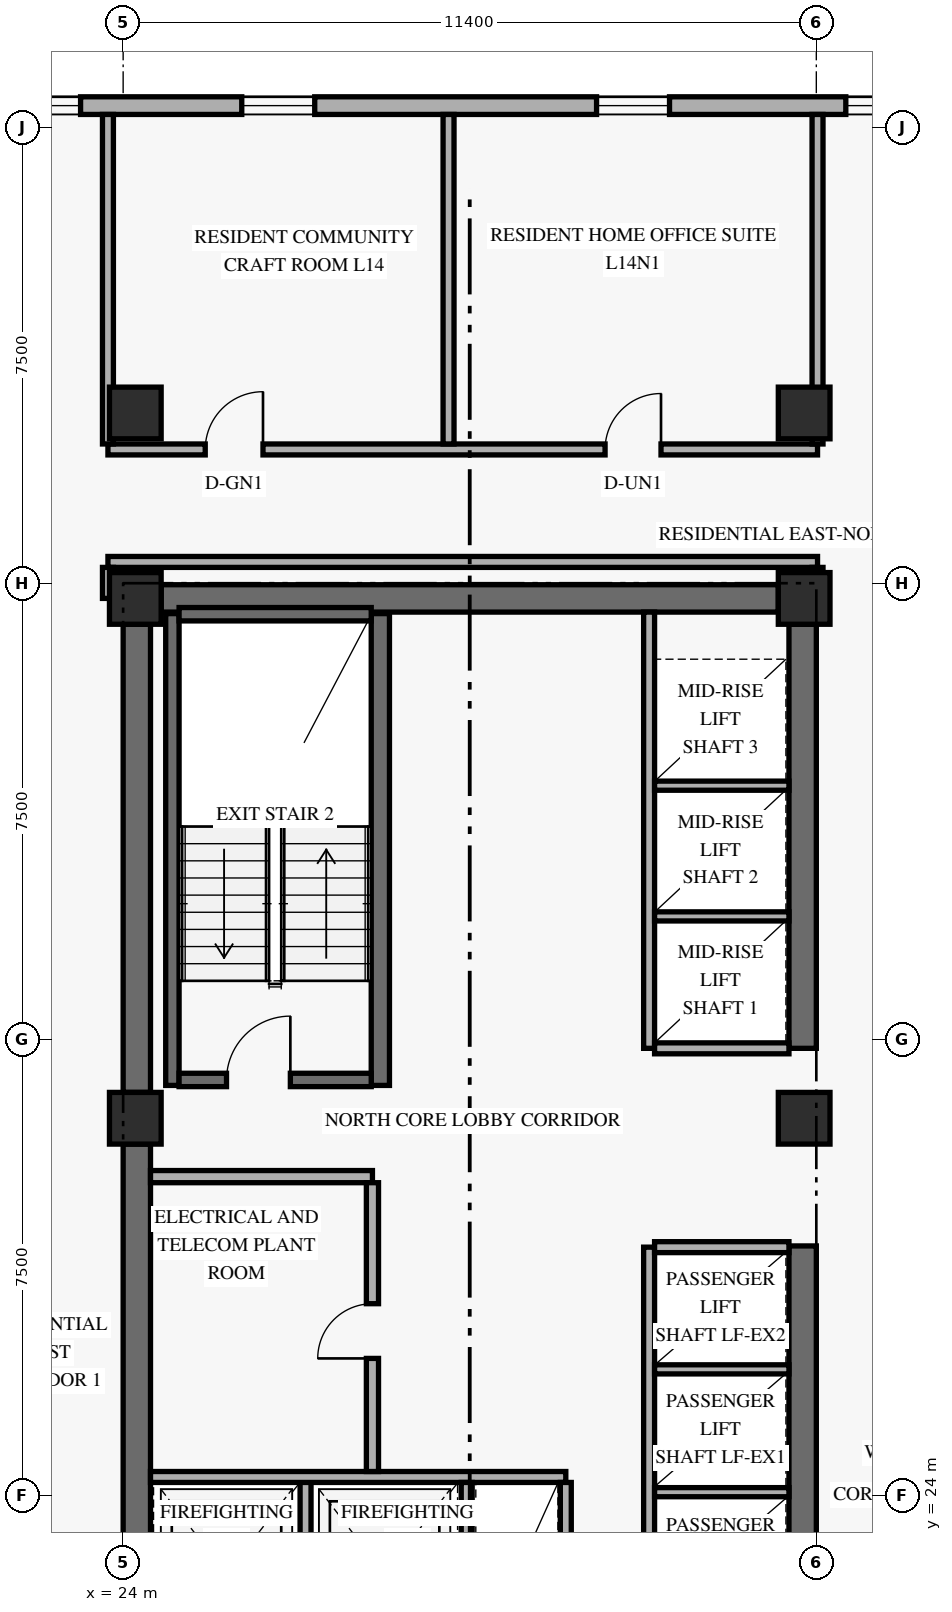
"""IFC4 building model, lengths in metres.
Left out: names, types, materials, properties, quantities, classifications, styles, units other than length and angle.
Written with IfcOpenShell. Run it as: python <this file> out.ifc"""

import sys

from ifc_helpers import new_model, si_unit, direction, frame, frame_2d, origin, origin_2d, place, context, subcontext, project, spatial, rectangle, extrude, element, fill, save


model = new_model("IFC4")
c1 = context("Model", 3, precision=1e-05, world=origin(), true_north=direction((0.0, 1.0)))
c2 = subcontext(c1, "Body", "Model", "MODEL_VIEW")
j1 = project(units=[si_unit("LENGTHUNIT", "METRE"), si_unit("PLANEANGLEUNIT", "RADIAN")], contexts=[c1])
p1 = place(None, origin())
s1 = spatial("IfcSite", under=j1, at=p1, CompositionType="ELEMENT")
p2 = place(p1, origin())
s2 = spatial("IfcBuilding", under=s1, at=p2, CompositionType="ELEMENT")
p3 = place(p2, frame((0.0, 0.0, 56.4)))
s3 = spatial("IfcBuildingStorey", under=s2, at=p3, CompositionType="ELEMENT", Elevation=56.4)
p4 = place(p3, frame((24.225, 17.975, 0.0), z_axis=(0.0, 0.0, 1.0), x_axis=(0.0, 1.0, 0.0)))
e1 = element("IfcWall", 1, at=p4, inside=s3, PredefinedType="SHEAR", context=c2, shape_type="SweptSolid", body=[
    extrude(rectangle(XDim=11.8, YDim=0.45, at=frame_2d((5.9, 0.0))), origin(), (0.0, 0.0, 1.0), 2.657),
])
p5 = place(p3, frame((24.225, 30.625, 0.0), z_axis=(0.0, 0.0, 1.0), x_axis=(0.0, 1.0, 0.0)))
e2 = element("IfcWall", 2, at=p5, inside=s3, PredefinedType="SHEAR", context=c2, shape_type="SweptSolid", body=[
    extrude(rectangle(XDim=7.7, YDim=0.45, at=frame_2d((3.85, 0.0))), origin(), (0.0, 0.0, 1.0), 2.657),
])
p6 = place(p3, frame((35.175, 17.975, 0.0), z_axis=(0.0, 0.0, 1.0), x_axis=(0.0, 1.0, 0.0)))
e3 = element("IfcWall", 3, at=p6, inside=s3, PredefinedType="SHEAR", context=c2, shape_type="SweptSolid", body=[
    extrude(rectangle(XDim=10.125, YDim=0.45, at=frame_2d((5.062, 0.0))), origin(), (0.0, 0.0, 1.0), 2.657),
])
p7 = place(p3, frame((35.175, 31.35, 0.0), z_axis=(0.0, 0.0, 1.0), x_axis=(0.0, 1.0, 0.0)))
e4 = element("IfcWall", 4, at=p7, inside=s3, PredefinedType="SHEAR", context=c2, shape_type="SweptSolid", body=[
    extrude(rectangle(XDim=6.975, YDim=0.45, at=frame_2d((3.487, 0.0))), origin(), (0.0, 0.0, 1.0), 2.657),
])
p8 = place(p3, frame((24.625, 38.75, 0.0), z_axis=(0.0, 0.0, 1.0), x_axis=(1.0, 0.0, 0.0)))
e5 = element("IfcWall", 5, at=p8, inside=s3, PredefinedType="SHEAR", context=c2, shape_type="SweptSolid", body=[
    extrude(rectangle(XDim=10.15, YDim=0.45, at=frame_2d((5.075, 0.0))), origin(), (0.0, 0.0, 1.0), 3.35),
])
p9 = place(p3, frame((24.81, 30.74, 0.0), z_axis=(0.0, 0.0, 1.0), x_axis=(0.0, 1.0, 0.0)))
e6 = element("IfcWall", 6, at=p9, inside=s3, PredefinedType="SHEAR", context=c2, shape_type="SweptSolid", body=[
    extrude(rectangle(XDim=7.76, YDim=0.22, at=frame_2d((3.88, 0.0))), origin(), (0.0, 0.0, 1.0), 3.35),
])
p10 = place(p3, frame((28.23, 30.74, 0.0), z_axis=(0.0, 0.0, 1.0), x_axis=(0.0, 1.0, 0.0)))
e7 = element("IfcWall", 7, at=p10, inside=s3, PredefinedType="SHEAR", context=c2, shape_type="SweptSolid", body=[
    extrude(rectangle(XDim=7.76, YDim=0.3, at=frame_2d((3.88, 0.0))), origin(), (0.0, 0.0, 1.0), 3.35),
])
p11 = place(p3, frame((24.92, 30.83, 0.0), z_axis=(0.0, 0.0, 1.0), x_axis=(1.0, 0.0, 0.0)))
e8 = element("IfcWall", 8, at=p11, inside=s3, PredefinedType="SHEAR", context=c2, shape_type="SweptSolid", body=[
    extrude(rectangle(XDim=3.16, YDim=0.22, at=frame_2d((1.58, 0.0))), origin(), (0.0, 0.0, 1.0), 3.35),
])
p12 = place(p11, frame((0.78, 0.0, 0.0)))
e9 = element("IfcOpeningElement", 9, at=p12, cuts=e8, PredefinedType="OPENING", context=c2, shape_type="SweptSolid", body=[
    extrude(rectangle(XDim=1.05, YDim=2.15, at=frame_2d((0.525, 1.075))), frame((0.0, 0.12, 0.0), z_axis=(0.0, -1.0, 0.0), x_axis=(1.0, 0.0, 0.0)), (0.0, 0.0, 1.0), 0.24),
])
p13 = place(p3, frame((24.92, 38.49, 0.0), z_axis=(0.0, 0.0, 1.0), x_axis=(1.0, 0.0, 0.0)))
e10 = element("IfcWall", 10, at=p13, inside=s3, PredefinedType="SHEAR", context=c2, shape_type="SweptSolid", body=[
    extrude(rectangle(XDim=3.16, YDim=0.22, at=frame_2d((1.58, 0.0))), origin(), (0.0, 0.0, 1.0), 3.35),
])
for number, where, z_axis, x_axis in (
    (11, (24.2, 30.2, 0.0), (0.0, 0.0, 1.0), (1.0, 0.0, 0.0)),
    (12, (24.2, 38.75, 0.0), (0.0, 0.0, 1.0), (1.0, 0.0, 0.0)),
    (13, (24.2, 41.8, 0.0), (0.0, 0.0, 1.0), (1.0, 0.0, 0.0)),
    (14, (35.2, 30.2, 0.0), (0.0, 0.0, 1.0), (1.0, 0.0, 0.0)),
    (15, (35.2, 38.75, 0.0), (0.0, 0.0, 1.0), (1.0, 0.0, 0.0)),
    (16, (35.2, 41.8, 0.0), (0.0, 0.0, 1.0), (1.0, 0.0, 0.0)),
):
    element("IfcColumn", number, at=place(p3, frame(where, z_axis=z_axis, x_axis=x_axis)), inside=s3, PredefinedType="COLUMN", context=c2, shape_type="SweptSolid", body=[
        extrude(rectangle(XDim=0.85, YDim=0.85, at=origin_2d()), origin(), (0.0, 0.0, 1.0), 3.6),
    ])
p14 = place(p3, frame((44.98, 46.855, 0.0), z_axis=(0.0, 0.0, 1.0), x_axis=(-1.0, 0.0, 0.0)))
e17 = element("IfcWall", 17, at=p14, inside=s3, PredefinedType="SOLIDWALL", context=c2, shape_type="SweptSolid", body=[
    extrude(rectangle(XDim=39.56, YDim=0.29, at=frame_2d((19.78, 0.0))), origin(), (0.0, 0.0, 1.0), 3.35),
])
p15 = place(p14, frame((30.845, 0.0, 0.85)))
e18 = element("IfcOpeningElement", 18, at=p15, cuts=e17, PredefinedType="OPENING", context=c2, shape_type="SweptSolid", body=[
    extrude(rectangle(XDim=1.2, YDim=1.5, at=frame_2d((0.6, 0.75))), frame((0.0, 0.155, 0.0), z_axis=(0.0, -1.0, 0.0), x_axis=(1.0, 0.0, 0.0)), (0.0, 0.0, 1.0), 0.31),
])
p16 = place(p14, frame((21.68, 0.0, 0.85)))
e19 = element("IfcOpeningElement", 19, at=p16, cuts=e17, PredefinedType="OPENING", context=c2, shape_type="SweptSolid", body=[
    extrude(rectangle(XDim=1.2, YDim=1.5, at=frame_2d((0.6, 0.75))), frame((0.0, 0.155, 0.0), z_axis=(0.0, -1.0, 0.0), x_axis=(1.0, 0.0, 0.0)), (0.0, 0.0, 1.0), 0.31),
])
p17 = place(p14, frame((17.829, 0.0, 0.85)))
e20 = element("IfcOpeningElement", 20, at=p17, cuts=e17, PredefinedType="OPENING", context=c2, shape_type="SweptSolid", body=[
    extrude(rectangle(XDim=1.2, YDim=1.5, at=frame_2d((0.6, 0.75))), frame((0.0, 0.155, 0.0), z_axis=(0.0, -1.0, 0.0), x_axis=(1.0, 0.0, 0.0)), (0.0, 0.0, 1.0), 0.31),
])
p18 = place(p14, frame((11.994, 0.0, 0.85)))
e21 = element("IfcOpeningElement", 21, at=p18, cuts=e17, PredefinedType="OPENING", context=c2, shape_type="SweptSolid", body=[
    extrude(rectangle(XDim=1.2, YDim=1.5, at=frame_2d((0.6, 0.75))), frame((0.0, 0.155, 0.0), z_axis=(0.0, -1.0, 0.0), x_axis=(1.0, 0.0, 0.0)), (0.0, 0.0, 1.0), 0.31),
])
p19 = place(p14, frame((7.895, 0.0, 0.85)))
e22 = element("IfcOpeningElement", 22, at=p19, cuts=e17, PredefinedType="OPENING", context=c2, shape_type="SweptSolid", body=[
    extrude(rectangle(XDim=1.2, YDim=1.5, at=frame_2d((0.6, 0.75))), frame((0.0, 0.155, 0.0), z_axis=(0.0, -1.0, 0.0), x_axis=(1.0, 0.0, 0.0)), (0.0, 0.0, 1.0), 0.31),
])
p20 = place(p14, frame((4.083, 0.0, 0.85)))
e23 = element("IfcOpeningElement", 23, at=p20, cuts=e17, PredefinedType="OPENING", context=c2, shape_type="SweptSolid", body=[
    extrude(rectangle(XDim=1.2, YDim=1.5, at=frame_2d((0.6, 0.75))), frame((0.0, 0.155, 0.0), z_axis=(0.0, -1.0, 0.0), x_axis=(1.0, 0.0, 0.0)), (0.0, 0.0, 1.0), 0.31),
])
p21 = place(p14, frame((0.367, 0.0, 0.85)))
e24 = element("IfcOpeningElement", 24, at=p21, cuts=e17, PredefinedType="OPENING", context=c2, shape_type="SweptSolid", body=[
    extrude(rectangle(XDim=1.2, YDim=1.5, at=frame_2d((0.6, 0.75))), frame((0.0, 0.155, 0.0), z_axis=(0.0, -1.0, 0.0), x_axis=(1.0, 0.0, 0.0)), (0.0, 0.0, 1.0), 0.31),
])
p22 = place(p3, frame((27.0, 21.19, 0.0), z_axis=(0.0, 0.0, 1.0), x_axis=(0.0, 1.0, 0.0)))
e25 = element("IfcWall", 25, at=p22, inside=s3, PredefinedType="STANDARD", context=c2, shape_type="SweptSolid", body=[
    extrude(rectangle(XDim=3.11, YDim=0.18, at=frame_2d((1.555, 0.0))), origin(), (0.0, 0.0, 1.0), 3.35),
])
p23 = place(p3, frame((24.45, 24.3, 0.0), z_axis=(0.0, 0.0, 1.0), x_axis=(1.0, 0.0, 0.0)))
e26 = element("IfcWall", 26, at=p23, inside=s3, PredefinedType="STANDARD", context=c2, shape_type="SweptSolid", body=[
    extrude(rectangle(XDim=6.83, YDim=0.18, at=frame_2d((3.415, 0.0))), origin(), (0.0, 0.0, 1.0), 3.35),
])
for number, where, z_axis, x_axis in (
    (27, (29.65, 21.19, 0.0), (0.0, 0.0, 1.0), (0.0, 1.0, 0.0)),
    (28, (31.28, 21.19, 0.0), (0.0, 0.0, 1.0), (0.0, 1.0, 0.0)),
):
    element("IfcWall", number, at=place(p3, frame(where, z_axis=z_axis, x_axis=x_axis)), inside=s3, PredefinedType="STANDARD", context=c2, shape_type="SweptSolid", body=[
        extrude(rectangle(XDim=3.02, YDim=0.18, at=frame_2d((1.51, 0.0))), origin(), (0.0, 0.0, 1.0), 3.35),
    ])
p24 = place(p3, frame((24.45, 29.24, 0.0), z_axis=(0.0, 0.0, 1.0), x_axis=(1.0, 0.0, 0.0)))
e29 = element("IfcWall", 29, at=p24, inside=s3, PredefinedType="STANDARD", context=c2, shape_type="SweptSolid", body=[
    extrude(rectangle(XDim=3.65, YDim=0.2, at=frame_2d((1.825, 0.0))), origin(), (0.0, 0.0, 1.0), 3.35),
])
p25 = place(p3, frame((28.1, 24.39, 0.0), z_axis=(0.0, 0.0, 1.0), x_axis=(0.0, 1.0, 0.0)))
e30 = element("IfcWall", 30, at=p25, inside=s3, PredefinedType="STANDARD", context=c2, shape_type="SweptSolid", body=[
    extrude(rectangle(XDim=4.75, YDim=0.2, at=frame_2d((2.375, 0.0))), origin(), (0.0, 0.0, 1.0), 3.35),
])
p26 = place(p25, frame((1.86, 0.0, 0.0)))
e31 = element("IfcOpeningElement", 31, at=p26, cuts=e30, PredefinedType="OPENING", context=c2, shape_type="SweptSolid", body=[
    extrude(rectangle(XDim=0.9, YDim=2.1, at=frame_2d((0.45, 1.05))), frame((0.0, 0.11, 0.0), z_axis=(0.0, -1.0, 0.0), x_axis=(1.0, 0.0, 0.0)), (0.0, 0.0, 1.0), 0.22),
])
p27 = place(p3, frame((32.65, 18.02, 0.0), z_axis=(0.0, 0.0, 1.0), x_axis=(0.0, 1.0, 0.0)))
e32 = element("IfcWall", 32, at=p27, inside=s3, PredefinedType="STANDARD", context=c2, shape_type="SweptSolid", body=[
    extrude(rectangle(XDim=10.06, YDim=0.18, at=frame_2d((5.03, 0.0))), origin(), (0.0, 0.0, 1.0), 3.35),
])
p28 = place(p3, frame((32.74, 28.08, 0.0), z_axis=(0.0, 0.0, 1.0), x_axis=(1.0, 0.0, 0.0)))
e33 = element("IfcWall", 33, at=p28, inside=s3, PredefinedType="STANDARD", context=c2, shape_type="SweptSolid", body=[
    extrude(rectangle(XDim=2.21, YDim=0.18, at=frame_2d((1.105, 0.0))), origin(), (0.0, 0.0, 1.0), 3.35),
])
for number, where, z_axis, x_axis in (
    (34, (32.74, 24.05, 0.0), (0.0, 0.0, 1.0), (1.0, 0.0, 0.0)),
    (35, (32.74, 26.07, 0.0), (0.0, 0.0, 1.0), (1.0, 0.0, 0.0)),
):
    element("IfcWall", number, at=place(p3, frame(where, z_axis=z_axis, x_axis=x_axis)), inside=s3, PredefinedType="STANDARD", context=c2, shape_type="SweptSolid", body=[
        extrude(rectangle(XDim=2.21, YDim=0.15, at=frame_2d((1.105, 0.0))), origin(), (0.0, 0.0, 1.0), 3.35),
    ])
p29 = place(p3, frame((32.65, 31.35, 0.0), z_axis=(0.0, 0.0, 1.0), x_axis=(0.0, 1.0, 0.0)))
e36 = element("IfcWall", 36, at=p29, inside=s3, PredefinedType="STANDARD", context=c2, shape_type="SweptSolid", body=[
    extrude(rectangle(XDim=7.175, YDim=0.18, at=frame_2d((3.587, 0.0))), origin(), (0.0, 0.0, 1.0), 3.35),
])
p30 = place(p3, frame((32.74, 31.35, 0.0), z_axis=(0.0, 0.0, 1.0), x_axis=(1.0, 0.0, 0.0)))
e37 = element("IfcWall", 37, at=p30, inside=s3, PredefinedType="STANDARD", context=c2, shape_type="SweptSolid", body=[
    extrude(rectangle(XDim=2.21, YDim=0.18, at=frame_2d((1.105, 0.0))), origin(), (0.0, 0.0, 1.0), 3.35),
])
for number, where, z_axis, x_axis in (
    (38, (32.74, 33.52, 0.0), (0.0, 0.0, 1.0), (1.0, 0.0, 0.0)),
    (39, (32.74, 35.67, 0.0), (0.0, 0.0, 1.0), (1.0, 0.0, 0.0)),
):
    element("IfcWall", number, at=place(p3, frame(where, z_axis=z_axis, x_axis=x_axis)), inside=s3, PredefinedType="STANDARD", context=c2, shape_type="SweptSolid", body=[
        extrude(rectangle(XDim=2.21, YDim=0.15, at=frame_2d((1.105, 0.0))), origin(), (0.0, 0.0, 1.0), 3.35),
    ])
p31 = place(p3, frame((23.75, 41.2, 0.0), z_axis=(0.0, 0.0, 1.0), x_axis=(1.0, 0.0, 0.0)))
e40 = element("IfcWall", 40, at=p31, inside=s3, PredefinedType="STANDARD", context=c2, shape_type="SweptSolid", body=[
    extrude(rectangle(XDim=11.67, YDim=0.18, at=frame_2d((5.835, 0.0))), origin(), (0.0, 0.0, 1.0), 2.639),
])
p32 = place(p31, frame((1.6, 0.0, 0.0)))
e41 = element("IfcOpeningElement", 41, at=p32, cuts=e40, PredefinedType="OPENING", context=c2, shape_type="SweptSolid", body=[
    extrude(rectangle(XDim=0.95, YDim=2.15, at=frame_2d((0.475, 1.075))), frame((0.0, 0.1, 0.0), z_axis=(0.0, -1.0, 0.0), x_axis=(1.0, 0.0, 0.0)), (0.0, 0.0, 1.0), 0.2),
])
p33 = place(p31, frame((8.176, 0.0, 0.0)))
e42 = element("IfcOpeningElement", 42, at=p33, cuts=e40, PredefinedType="OPENING", context=c2, shape_type="SweptSolid", body=[
    extrude(rectangle(XDim=0.92, YDim=2.15, at=frame_2d((0.46, 1.075))), frame((0.0, 0.1, 0.0), z_axis=(0.0, -1.0, 0.0), x_axis=(1.0, 0.0, 0.0)), (0.0, 0.0, 1.0), 0.2),
])
p34 = place(p3, frame((23.75, 39.35, 0.0), z_axis=(0.0, 0.0, 1.0), x_axis=(1.0, 0.0, 0.0)))
e43 = element("IfcWall", 43, at=p34, inside=s3, PredefinedType="STANDARD", context=c2, shape_type="SweptSolid", body=[
    extrude(rectangle(XDim=11.67, YDim=0.18, at=frame_2d((5.835, 0.0))), origin(), (0.0, 0.0, 1.0), 2.639),
])
p35 = place(p3, frame((35.42, 38.75, 0.0), z_axis=(0.0, 0.0, 1.0), x_axis=(0.0, 1.0, 0.0)))
e44 = element("IfcWall", 44, at=p35, inside=s3, PredefinedType="STANDARD", context=c2, shape_type="SweptSolid", body=[
    extrude(rectangle(XDim=0.51, YDim=0.18, at=frame_2d((0.255, 0.0))), origin(), (0.0, 0.0, 1.0), 3.35),
])
p36 = place(p3, frame((35.42, 41.29, 0.0), z_axis=(0.0, 0.0, 1.0), x_axis=(0.0, 1.0, 0.0)))
e45 = element("IfcWall", 45, at=p36, inside=s3, PredefinedType="PARTITIONING", context=c2, shape_type="SweptSolid", body=[
    extrude(rectangle(XDim=5.42, YDim=0.18, at=frame_2d((2.71, 0.0))), origin(), (0.0, 0.0, 1.0), 3.35),
])
p37 = place(p3, frame((23.75, 38.75, 0.0), z_axis=(0.0, 0.0, 1.0), x_axis=(0.0, 1.0, 0.0)))
e46 = element("IfcWall", 46, at=p37, inside=s3, PredefinedType="STANDARD", context=c2, shape_type="SweptSolid", body=[
    extrude(rectangle(XDim=0.51, YDim=0.18, at=frame_2d((0.255, 0.0))), origin(), (0.0, 0.0, 1.0), 2.639),
])
for number, where, z_axis, x_axis in (
    (47, (23.75, 41.29, 0.0), (0.0, 0.0, 1.0), (0.0, 1.0, 0.0)),
    (48, (29.352, 41.29, 0.0), (0.0, 0.0, 1.0), (0.0, 1.0, 0.0)),
):
    element("IfcWall", number, at=place(p3, frame(where, z_axis=z_axis, x_axis=x_axis)), inside=s3, PredefinedType="PARTITIONING", context=c2, shape_type="SweptSolid", body=[
        extrude(rectangle(XDim=5.42, YDim=0.18, at=frame_2d((2.71, 0.0))), origin(), (0.0, 0.0, 1.0), 2.799),
    ])
p38 = place(p16, origin())
e49 = element("IfcWindow", 49, at=p38, inside=s3, PartitioningType="SINGLE_PANEL", PredefinedType="WINDOW", context=c2, shape_type="SweptSolid", body=[
    extrude(rectangle(XDim=1.2, YDim=1.5, at=frame_2d((0.6, 0.75))), frame((0.0, 0.03, 0.0), z_axis=(0.0, -1.0, 0.0), x_axis=(1.0, 0.0, 0.0)), (0.0, 0.0, 1.0), 0.06),
])
fill(e19, e49)
p39 = place(p17, origin())
e50 = element("IfcWindow", 50, at=p39, inside=s3, PartitioningType="SINGLE_PANEL", PredefinedType="WINDOW", context=c2, shape_type="SweptSolid", body=[
    extrude(rectangle(XDim=1.2, YDim=1.5, at=frame_2d((0.6, 0.75))), frame((0.0, 0.03, 0.0), z_axis=(0.0, -1.0, 0.0), x_axis=(1.0, 0.0, 0.0)), (0.0, 0.0, 1.0), 0.06),
])
fill(e20, e50)
p40 = place(p18, origin())
e51 = element("IfcWindow", 51, at=p40, inside=s3, PartitioningType="SINGLE_PANEL", PredefinedType="WINDOW", context=c2, shape_type="SweptSolid", body=[
    extrude(rectangle(XDim=1.2, YDim=1.5, at=frame_2d((0.6, 0.75))), frame((0.0, 0.03, 0.0), z_axis=(0.0, -1.0, 0.0), x_axis=(1.0, 0.0, 0.0)), (0.0, 0.0, 1.0), 0.06),
])
fill(e21, e51)
p41 = place(p19, origin())
e52 = element("IfcWindow", 52, at=p41, inside=s3, PartitioningType="SINGLE_PANEL", PredefinedType="WINDOW", context=c2, shape_type="SweptSolid", body=[
    extrude(rectangle(XDim=1.2, YDim=1.5, at=frame_2d((0.6, 0.75))), frame((0.0, 0.03, 0.0), z_axis=(0.0, -1.0, 0.0), x_axis=(1.0, 0.0, 0.0)), (0.0, 0.0, 1.0), 0.06),
])
fill(e22, e52)
p42 = place(p12, origin())
e53 = element("IfcDoor", 53, at=p42, inside=s3, OperationType="SINGLE_SWING_RIGHT", PredefinedType="DOOR", context=c2, shape_type="SweptSolid", body=[
    extrude(rectangle(XDim=1.05, YDim=2.15, at=frame_2d((0.525, 1.075))), frame((0.0, 0.025, 0.0), z_axis=(0.0, -1.0, 0.0), x_axis=(1.0, 0.0, 0.0)), (0.0, 0.0, 1.0), 0.05),
])
fill(e9, e53)
p43 = place(p26, origin())
e54 = element("IfcDoor", 54, at=p43, inside=s3, OperationType="SINGLE_SWING_LEFT", PredefinedType="DOOR", context=c2, shape_type="SweptSolid", body=[
    extrude(rectangle(XDim=0.9, YDim=2.1, at=frame_2d((0.45, 1.05))), frame((0.0, 0.025, 0.0), z_axis=(0.0, -1.0, 0.0), x_axis=(1.0, 0.0, 0.0)), (0.0, 0.0, 1.0), 0.05),
])
fill(e31, e54)
p44 = place(p32, origin())
e55 = element("IfcDoor", 55, at=p44, inside=s3, OperationType="SINGLE_SWING_RIGHT", PredefinedType="DOOR", context=c2, shape_type="SweptSolid", body=[
    extrude(rectangle(XDim=0.95, YDim=2.15, at=frame_2d((0.475, 1.075))), frame((0.0, 0.025, 0.0), z_axis=(0.0, -1.0, 0.0), x_axis=(1.0, 0.0, 0.0)), (0.0, 0.0, 1.0), 0.05),
])
fill(e41, e55)
p45 = place(p33, origin())
e56 = element("IfcDoor", 56, at=p45, inside=s3, OperationType="SINGLE_SWING_RIGHT", PredefinedType="DOOR", context=c2, shape_type="SweptSolid", body=[
    extrude(rectangle(XDim=0.92, YDim=2.15, at=frame_2d((0.46, 1.075))), frame((0.0, 0.025, 0.0), z_axis=(0.0, -1.0, 0.0), x_axis=(1.0, 0.0, 0.0)), (0.0, 0.0, 1.0), 0.05),
])
fill(e42, e56)
save(model, sys.argv[1])
